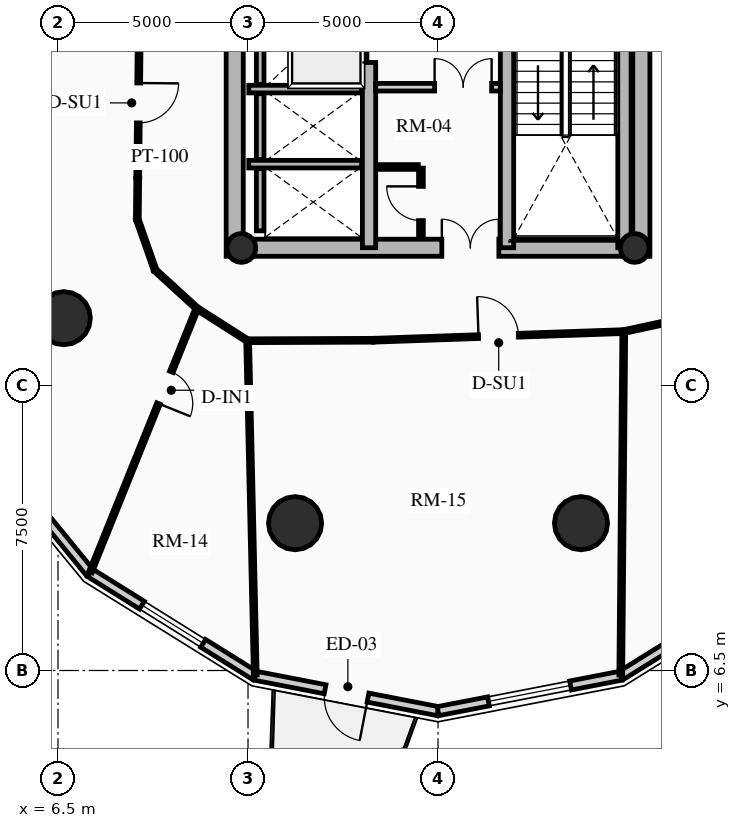
"""IFC4 building model, lengths in metres.
Left out: names, types, materials, properties, quantities, classifications, styles, units other than length and angle.
Written with IfcOpenShell. Run it as: python <this file> out.ifc"""

import sys

from ifc_helpers import new_model, si_unit, direction, frame, frame_2d, origin, origin_2d, place, context, subcontext, project, spatial, rectangle, circle, hollow_circle, extrude, source, transform, mapped, element, fill, save


model = new_model("IFC4")
c1 = context("Model", 3, precision=1e-05, world=origin(), true_north=direction((0.0, 1.0)))
c2 = subcontext(c1, "Body", "Model", "MODEL_VIEW")
j1 = project(units=[si_unit("LENGTHUNIT", "METRE"), si_unit("PLANEANGLEUNIT", "RADIAN")], contexts=[c1])
p1 = place(None, origin())
s1 = spatial("IfcSite", under=j1, at=p1, CompositionType="ELEMENT")
p2 = place(p1, origin())
s2 = spatial("IfcBuilding", under=s1, at=p2, CompositionType="ELEMENT")
p3 = place(p2, frame((0.0, 0.0, 96.34)))
s3 = spatial("IfcBuildingStorey", under=s2, at=p3, CompositionType="ELEMENT", Elevation=96.34)
for number, where, z_axis, x_axis in (
    (1, (11.15, 17.4, 0.0), (0.0, 0.0, 1.0), (0.0, 1.0, 0.0)),
    (2, (21.85, 17.4, 0.0), (0.0, 0.0, 1.0), (0.0, 1.0, 0.0)),
):
    element("IfcWall", number, at=place(p3, frame(where, z_axis=z_axis, x_axis=x_axis)), inside=s3, PredefinedType="SHEAR", context=c2, shape_type="SweptSolid", body=[
        extrude(rectangle(XDim=14.2, YDim=0.45, at=frame_2d((7.1, 0.0))), origin(), (0.0, 0.0, 1.0), 2.91),
    ])
p4 = place(p3, frame((11.15, 17.625, 0.0), z_axis=(0.0, 0.0, 1.0), x_axis=(1.0, 0.0, 0.0)))
e3 = element("IfcWall", 3, at=p4, inside=s3, PredefinedType="SHEAR", context=c2, shape_type="SweptSolid", body=[
    extrude(rectangle(XDim=10.7, YDim=0.45, at=frame_2d((5.35, 0.0))), origin(), (0.0, 0.0, 1.0), 2.91),
])
m1 = source(origin(), c2, "Body", "SweptSolid", [
    extrude(rectangle(XDim=1.5, YDim=2.02, at=frame_2d((0.75, 1.01))), frame((0.0, 0.235, 0.0), z_axis=(0.0, -1.0, 0.0), x_axis=(1.0, 0.0, 0.0)), (0.0, 0.0, 1.0), 0.47),
])
p5 = place(p4, frame((5.45, 0.0, 0.0)))
e4 = element("IfcOpeningElement", 4, at=p5, cuts=e3, PredefinedType="OPENING", context=c2, shape_type="MappedRepresentation", body=[
    mapped(m1, transform((0.0, 0.0, 0.0), x_axis=(1.0, 0.0, 0.0), y_axis=(0.0, 1.0, 0.0), z_axis=(0.0, 0.0, 1.0), scale=1.0)),
])
p6 = place(p3, frame((14.685, 17.625, 0.0), z_axis=(0.0, 0.0, 1.0), x_axis=(0.0, 1.0, 0.0)))
e5 = element("IfcWall", 5, at=p6, inside=s3, PredefinedType="SHEAR", context=c2, shape_type="SweptSolid", body=[
    extrude(rectangle(XDim=13.75, YDim=0.35, at=frame_2d((6.875, 0.0))), origin(), (0.0, 0.0, 1.0), 2.91),
])
m2 = source(origin(), c2, "Body", "SweptSolid", [
    extrude(rectangle(XDim=1.1, YDim=2.015, at=frame_2d((0.55, 1.007))), frame((0.0, 0.185, 0.0), z_axis=(0.0, -1.0, 0.0), x_axis=(1.0, 0.0, 0.0)), (0.0, 0.0, 1.0), 0.37),
])
p7 = place(p6, frame((4.875, 0.0, 0.0)))
e6 = element("IfcOpeningElement", 6, at=p7, cuts=e5, PredefinedType="OPENING", context=c2, shape_type="MappedRepresentation", body=[
    mapped(m2, transform((0.0, 0.0, 0.0), x_axis=(1.0, 0.0, 0.0), y_axis=(0.0, 1.0, 0.0), z_axis=(0.0, 0.0, 1.0), scale=1.0)),
])
m3 = source(origin(), c2, "Body", "SweptSolid", [
    extrude(rectangle(XDim=1.15, YDim=2.02, at=frame_2d((0.575, 1.01))), frame((0.0, 0.185, 0.0), z_axis=(0.0, -1.0, 0.0), x_axis=(1.0, 0.0, 0.0)), (0.0, 0.0, 1.0), 0.37),
])
p8 = place(p6, frame((7.295, 0.0, 0.0)))
e7 = element("IfcOpeningElement", 7, at=p8, cuts=e5, PredefinedType="OPENING", context=c2, shape_type="MappedRepresentation", body=[
    mapped(m3, transform((0.0, 0.0, 0.0), x_axis=(1.0, 0.0, 0.0), y_axis=(0.0, 1.0, 0.0), z_axis=(0.0, 0.0, 1.0), scale=1.0)),
])
p9 = place(p3, frame((18.315, 17.625, 0.0), z_axis=(0.0, 0.0, 1.0), x_axis=(0.0, 1.0, 0.0)))
e8 = element("IfcWall", 8, at=p9, inside=s3, PredefinedType="SHEAR", context=c2, shape_type="SweptSolid", body=[
    extrude(rectangle(XDim=13.75, YDim=0.35, at=frame_2d((6.875, 0.0))), origin(), (0.0, 0.0, 1.0), 2.91),
])
p10 = place(p9, frame((10.0, 0.0, 0.0)))
e9 = element("IfcOpeningElement", 9, at=p10, cuts=e8, PredefinedType="OPENING", context=c2, shape_type="MappedRepresentation", body=[
    mapped(m2, transform((0.0, 0.0, 0.0), x_axis=(1.0, 0.0, 0.0), y_axis=(0.0, 1.0, 0.0), z_axis=(0.0, 0.0, 1.0), scale=1.0)),
])
p11 = place(p9, frame((12.0, 0.0, 0.0)))
e10 = element("IfcOpeningElement", 10, at=p11, cuts=e8, PredefinedType="OPENING", context=c2, shape_type="MappedRepresentation", body=[
    mapped(m2, transform((0.0, 0.0, 0.0), x_axis=(1.0, 0.0, 0.0), y_axis=(0.0, 1.0, 0.0), z_axis=(0.0, 0.0, 1.0), scale=1.0)),
])
p12 = place(p9, frame((5.305, 0.0, 0.0)))
e11 = element("IfcOpeningElement", 11, at=p12, cuts=e8, PredefinedType="OPENING", context=c2, shape_type="MappedRepresentation", body=[
    mapped(m3, transform((0.0, 0.0, 0.0), x_axis=(1.0, 0.0, 0.0), y_axis=(0.0, 1.0, 0.0), z_axis=(0.0, 0.0, 1.0), scale=1.0)),
])
p13 = place(p3, frame((21.405, 17.625, 0.0), z_axis=(0.0, 0.0, 1.0), x_axis=(0.0, 1.0, 0.0)))
e12 = element("IfcWall", 12, at=p13, inside=s3, PredefinedType="SHEAR", context=c2, shape_type="SweptSolid", body=[
    extrude(rectangle(XDim=6.72, YDim=0.35, at=frame_2d((3.36, 0.0))), origin(), (0.0, 0.0, 1.0), 2.91),
])
for number, where, z_axis, x_axis in (
    (13, (11.325, 17.62, 0.0), (0.0, 0.0, 1.0), (1.0, 0.0, 0.0)),
    (14, (21.675, 17.62, 0.0), (0.0, 0.0, 1.0), (1.0, 0.0, 0.0)),
):
    element("IfcColumn", number, at=place(p3, frame(where, z_axis=z_axis, x_axis=x_axis)), inside=s3, PredefinedType="COLUMN", context=c2, shape_type="SweptSolid", body=[
        extrude(hollow_circle(Radius=0.38, WallThickness=0.032, at=origin_2d()), origin(), (0.0, 0.0, 1.0), 2.91),
    ])
for number, where, z_axis, x_axis in (
    (15, (6.653, 15.771, 0.0), (0.0, 0.0, 1.0), (1.0, 0.0, 0.0)),
    (16, (12.739, 10.377, 0.0), (0.0, 0.0, 1.0), (1.0, 0.0, 0.0)),
    (17, (20.261, 10.377, 0.0), (0.0, 0.0, 1.0), (1.0, 0.0, 0.0)),
):
    element("IfcColumn", number, at=place(p3, frame(where, z_axis=z_axis, x_axis=x_axis)), inside=s3, PredefinedType="USERDEFINED", context=c2, shape_type="SweptSolid", body=[
        extrude(circle(Radius=0.7, at=origin_2d()), origin(), (0.0, 0.0, 1.0), 2.91),
    ])
p14 = place(p3, frame((7.342, 9.072, 0.0), z_axis=(0.0, 0.0, 1.0), x_axis=(-0.632700781152, 0.77439635945, 0.0)))
e18 = element("IfcWall", 18, at=p14, inside=s3, PredefinedType="SOLIDWALL", context=c2, shape_type="SweptSolid", body=[
    extrude(rectangle(XDim=5.448, YDim=0.24, at=frame_2d((2.724, 0.0))), origin(), (0.0, 0.0, 1.0), 2.179),
])
p15 = place(p3, frame((11.685, 6.363, 0.0), z_axis=(0.0, 0.0, 1.0), x_axis=(-0.848520380187, 0.529162701263, 0.0)))
e19 = element("IfcWall", 19, at=p15, inside=s3, PredefinedType="SOLIDWALL", context=c2, shape_type="SweptSolid", body=[
    extrude(rectangle(XDim=5.119, YDim=0.24, at=frame_2d((2.56, 0.0))), origin(), (0.0, 0.0, 1.0), 2.179),
])
m4 = source(origin(), c2, "Body", "SweptSolid", [
    extrude(rectangle(XDim=1.9, YDim=1.35, at=frame_2d((0.95, 0.675))), frame((0.0, 0.13, 0.0), z_axis=(0.0, -1.0, 0.0), x_axis=(1.0, 0.0, 0.0)), (0.0, 0.0, 1.0), 0.26),
])
p16 = place(p15, frame((1.609, 0.0, 0.65)))
e20 = element("IfcOpeningElement", 20, at=p16, cuts=e19, PredefinedType="OPENING", context=c2, shape_type="MappedRepresentation", body=[
    mapped(m4, transform((0.0, 0.0, 0.0), x_axis=(1.0, 0.0, 0.0), y_axis=(0.0, 1.0, 0.0), z_axis=(0.0, 0.0, 1.0), scale=1.0)),
])
p17 = place(p3, frame((16.5, 5.43, 0.0), z_axis=(0.0, 0.0, 1.0), x_axis=(-0.981723785992, 0.190311344954, 0.0)))
e21 = element("IfcWall", 21, at=p17, inside=s3, PredefinedType="SOLIDWALL", context=c2, shape_type="SweptSolid", body=[
    extrude(rectangle(XDim=4.904, YDim=0.24, at=frame_2d((2.452, 0.0))), origin(), (0.0, 0.0, 1.0), 2.179),
])
m5 = source(origin(), c2, "Body", "SweptSolid", [
    extrude(rectangle(XDim=1.15, YDim=2.005, at=frame_2d((0.575, 1.002))), frame((0.0, 0.13, 0.0), z_axis=(0.0, -1.0, 0.0), x_axis=(1.0, 0.0, 0.0)), (0.0, 0.0, 1.0), 0.26),
])
p18 = place(p17, frame((1.877, 0.0, 0.0)))
e22 = element("IfcOpeningElement", 22, at=p18, cuts=e21, PredefinedType="OPENING", context=c2, shape_type="MappedRepresentation", body=[
    mapped(m5, transform((0.0, 0.0, 0.0), x_axis=(1.0, 0.0, 0.0), y_axis=(0.0, 1.0, 0.0), z_axis=(0.0, 0.0, 1.0), scale=1.0)),
])
p19 = place(p3, frame((21.315, 6.363, 0.0), z_axis=(0.0, 0.0, 1.0), x_axis=(-0.981723785992, -0.190311344954, 0.0)))
e23 = element("IfcWall", 23, at=p19, inside=s3, PredefinedType="SOLIDWALL", context=c2, shape_type="SweptSolid", body=[
    extrude(rectangle(XDim=4.904, YDim=0.24, at=frame_2d((2.452, 0.0))), origin(), (0.0, 0.0, 1.0), 2.179),
])
m6 = source(origin(), c2, "Body", "SweptSolid", [
    extrude(rectangle(XDim=2.2, YDim=1.35, at=frame_2d((1.1, 0.675))), frame((0.0, 0.13, 0.0), z_axis=(0.0, -1.0, 0.0), x_axis=(1.0, 0.0, 0.0)), (0.0, 0.0, 1.0), 0.26),
])
p20 = place(p19, frame((1.352, 0.0, 0.65)))
e24 = element("IfcOpeningElement", 24, at=p20, cuts=e23, PredefinedType="OPENING", context=c2, shape_type="MappedRepresentation", body=[
    mapped(m6, transform((0.0, 0.0, 0.0), x_axis=(1.0, 0.0, 0.0), y_axis=(0.0, 1.0, 0.0), z_axis=(0.0, 0.0, 1.0), scale=1.0)),
])
p21 = place(p3, frame((25.658, 9.072, 0.0), z_axis=(0.0, 0.0, 1.0), x_axis=(-0.848520380187, -0.529162701263, 0.0)))
e25 = element("IfcWall", 25, at=p21, inside=s3, PredefinedType="SOLIDWALL", context=c2, shape_type="SweptSolid", body=[
    extrude(rectangle(XDim=5.119, YDim=0.24, at=frame_2d((2.56, 0.0))), origin(), (0.0, 0.0, 1.0), 2.179),
])
p22 = place(p3, frame((11.52, 21.8, 0.0), z_axis=(0.0, 0.0, 1.0), x_axis=(1.0, 0.0, 0.0)))
e26 = element("IfcWall", 26, at=p22, inside=s3, PredefinedType="SHEAR", context=c2, shape_type="SweptSolid", body=[
    extrude(rectangle(XDim=2.97, YDim=0.2, at=frame_2d((1.485, 0.0))), origin(), (0.0, 0.0, 1.0), 2.91),
])
p23 = place(p3, frame((11.82, 21.92, 0.0), z_axis=(0.0, 0.0, 1.0), x_axis=(0.0, 1.0, 0.0)))
e27 = element("IfcWall", 27, at=p23, inside=s3, PredefinedType="SHEAR", context=c2, shape_type="SweptSolid", body=[
    extrude(rectangle(XDim=2.44, YDim=0.2, at=frame_2d((1.22, 0.0))), origin(), (0.0, 0.0, 1.0), 2.91),
])
p24 = place(p3, frame((11.52, 19.825, 0.0), z_axis=(0.0, 0.0, 1.0), x_axis=(1.0, 0.0, 0.0)))
e28 = element("IfcWall", 28, at=p24, inside=s3, PredefinedType="SHEAR", context=c2, shape_type="SweptSolid", body=[
    extrude(rectangle(XDim=2.97, YDim=0.2, at=frame_2d((1.485, 0.0))), origin(), (0.0, 0.0, 1.0), 2.91),
])
p25 = place(p3, frame((11.82, 19.945, 0.0), z_axis=(0.0, 0.0, 1.0), x_axis=(0.0, 1.0, 0.0)))
e29 = element("IfcWall", 29, at=p25, inside=s3, PredefinedType="SHEAR", context=c2, shape_type="SweptSolid", body=[
    extrude(rectangle(XDim=1.735, YDim=0.2, at=frame_2d((0.867, 0.0))), origin(), (0.0, 0.0, 1.0), 2.91),
])
p26 = place(p3, frame((11.82, 18.07, 0.0), z_axis=(0.0, 0.0, 1.0), x_axis=(0.0, 1.0, 0.0)))
e30 = element("IfcWall", 30, at=p26, inside=s3, PredefinedType="SHEAR", context=c2, shape_type="SweptSolid", body=[
    extrude(rectangle(XDim=1.635, YDim=0.2, at=frame_2d((0.817, 0.0))), origin(), (0.0, 0.0, 1.0), 2.91),
])
p27 = place(p3, frame((14.86, 21.85, 0.0), z_axis=(0.0, 0.0, 1.0), x_axis=(1.0, 0.0, 0.0)))
e31 = element("IfcWall", 31, at=p27, inside=s3, PredefinedType="PARTITIONING", context=c2, shape_type="SweptSolid", body=[
    extrude(rectangle(XDim=3.28, YDim=0.2, at=frame_2d((1.64, 0.0))), origin(), (0.0, 0.0, 1.0), 2.655),
])
m7 = source(origin(), c2, "Body", "SweptSolid", [
    extrude(rectangle(XDim=1.5, YDim=2.02, at=frame_2d((0.75, 1.01))), frame((0.0, 0.11, 0.0), z_axis=(0.0, -1.0, 0.0), x_axis=(1.0, 0.0, 0.0)), (0.0, 0.0, 1.0), 0.22),
])
p28 = place(p27, frame((1.55, 0.0, 0.0)))
e32 = element("IfcOpeningElement", 32, at=p28, cuts=e31, PredefinedType="OPENING", context=c2, shape_type="MappedRepresentation", body=[
    mapped(m7, transform((0.0, 0.0, 0.0), x_axis=(1.0, 0.0, 0.0), y_axis=(0.0, 1.0, 0.0), z_axis=(0.0, 0.0, 1.0), scale=1.0)),
])
p29 = place(p3, frame((16.05, 17.92, 0.0), z_axis=(0.0, 0.0, 1.0), x_axis=(0.0, 1.0, 0.0)))
e33 = element("IfcWall", 33, at=p29, inside=s3, PredefinedType="PARTITIONING", context=c2, shape_type="SweptSolid", body=[
    extrude(rectangle(XDim=1.8, YDim=0.125, at=frame_2d((0.9, 0.0))), origin(), (0.0, 0.0, 1.0), 2.655),
])
m8 = source(origin(), c2, "Body", "SweptSolid", [
    extrude(rectangle(XDim=0.9, YDim=2.005, at=frame_2d((0.45, 1.002))), frame((0.0, 0.073, 0.0), z_axis=(0.0, -1.0, 0.0), x_axis=(1.0, 0.0, 0.0)), (0.0, 0.0, 1.0), 0.145),
])
p30 = place(p29, frame((0.42, 0.0, 0.0)))
e34 = element("IfcOpeningElement", 34, at=p30, cuts=e33, PredefinedType="OPENING", context=c2, shape_type="MappedRepresentation", body=[
    mapped(m8, transform((0.0, 0.0, 0.0), x_axis=(1.0, 0.0, 0.0), y_axis=(0.0, 1.0, 0.0), z_axis=(0.0, 0.0, 1.0), scale=1.0)),
])
p31 = place(p3, frame((14.88, 19.75, 0.0), z_axis=(0.0, 0.0, 1.0), x_axis=(1.0, 0.0, 0.0)))
e35 = element("IfcWall", 35, at=p31, inside=s3, PredefinedType="PARTITIONING", context=c2, shape_type="SweptSolid", body=[
    extrude(rectangle(XDim=1.1, YDim=0.125, at=frame_2d((0.55, 0.0))), origin(), (0.0, 0.0, 1.0), 2.655),
])
p32 = place(p3, frame((8.65, 24.5, 0.0), z_axis=(0.0, 0.0, 1.0), x_axis=(-0.010196235655, -0.999948017038, 0.0)))
e36 = element("IfcWall", 36, at=p32, inside=s3, PredefinedType="MOVABLE", context=c2, shape_type="SweptSolid", body=[
    extrude(rectangle(XDim=6.13, YDim=0.1, at=frame_2d((3.065, 0.0))), origin(), (0.0, 0.0, 1.0), 2.225),
])
m9 = source(origin(), c2, "Body", "SweptSolid", [
    extrude(rectangle(XDim=1.05, YDim=2.015, at=frame_2d((0.525, 1.007))), frame((0.0, 0.06, 0.0), z_axis=(0.0, -1.0, 0.0), x_axis=(1.0, 0.0, 0.0)), (0.0, 0.0, 1.0), 0.12),
])
p33 = place(p32, frame((2.54, 0.0, 0.0)))
e37 = element("IfcOpeningElement", 37, at=p33, cuts=e36, PredefinedType="OPENING", context=c2, shape_type="MappedRepresentation", body=[
    mapped(m9, transform((0.0, 0.0, 0.0), x_axis=(1.0, 0.0, 0.0), y_axis=(0.0, 1.0, 0.0), z_axis=(0.0, 0.0, 1.0), scale=1.0)),
])
p34 = place(p3, frame((8.587, 18.371, 0.0), z_axis=(0.0, 0.0, 1.0), x_axis=(0.331494289155, -0.943457225452, 0.0)))
e38 = element("IfcWall", 38, at=p34, inside=s3, PredefinedType="MOVABLE", context=c2, shape_type="SweptSolid", body=[
    extrude(rectangle(XDim=1.416, YDim=0.1, at=frame_2d((0.708, 0.0))), origin(), (0.0, 0.0, 1.0), 2.225),
])
p35 = place(p3, frame((9.057, 17.034, 0.0), z_axis=(0.0, 0.0, 1.0), x_axis=(0.737874877538, -0.674937526811, 0.0)))
e39 = element("IfcWall", 39, at=p35, inside=s3, PredefinedType="MOVABLE", context=c2, shape_type="SweptSolid", body=[
    extrude(rectangle(XDim=1.49, YDim=0.1, at=frame_2d((0.745, 0.0))), origin(), (0.0, 0.0, 1.0), 2.225),
])
p36 = place(p3, frame((10.156, 16.029, 0.0), z_axis=(0.0, 0.0, 1.0), x_axis=(0.843127549493, -0.537713618282, 0.0)))
e40 = element("IfcWall", 40, at=p36, inside=s3, PredefinedType="MOVABLE", context=c2, shape_type="SweptSolid", body=[
    extrude(rectangle(XDim=1.583, YDim=0.1, at=frame_2d((0.792, 0.0))), origin(), (0.0, 0.0, 1.0), 2.225),
])
p37 = place(p3, frame((11.49, 15.178, 0.0), z_axis=(0.0, 0.0, 1.0), x_axis=(0.99999260582, 0.003845556538, 0.0)))
e41 = element("IfcWall", 41, at=p37, inside=s3, PredefinedType="MOVABLE", context=c2, shape_type="SweptSolid", body=[
    extrude(rectangle(XDim=3.301, YDim=0.1, at=frame_2d((1.651, 0.0))), origin(), (0.0, 0.0, 1.0), 2.225),
])
p38 = place(p3, frame((14.792, 15.191, 0.0), z_axis=(0.0, 0.0, 1.0), x_axis=(0.999405559957, 0.034475015985, 0.0)))
e42 = element("IfcWall", 42, at=p38, inside=s3, PredefinedType="MOVABLE", context=c2, shape_type="SweptSolid", body=[
    extrude(rectangle(XDim=6.6, YDim=0.1, at=frame_2d((3.3, 0.0))), origin(), (0.0, 0.0, 1.0), 2.225),
])
p39 = place(p38, frame((2.775, 0.0, 0.0)))
e43 = element("IfcOpeningElement", 43, at=p39, cuts=e42, PredefinedType="OPENING", context=c2, shape_type="MappedRepresentation", body=[
    mapped(m9, transform((0.0, 0.0, 0.0), x_axis=(1.0, 0.0, 0.0), y_axis=(0.0, 1.0, 0.0), z_axis=(0.0, 0.0, 1.0), scale=1.0)),
])
p40 = place(p3, frame((21.388, 15.418, 0.0), z_axis=(0.0, 0.0, 1.0), x_axis=(0.977297113048, 0.211873435874, 0.0)))
e44 = element("IfcWall", 44, at=p40, inside=s3, PredefinedType="MOVABLE", context=c2, shape_type="SweptSolid", body=[
    extrude(rectangle(XDim=1.877, YDim=0.1, at=frame_2d((0.938, 0.0))), origin(), (0.0, 0.0, 1.0), 2.225),
])
p41 = place(p3, frame((11.49, 15.178, 0.0), z_axis=(0.0, 0.0, 1.0), x_axis=(0.022838019925, -0.999739178409, 0.0)))
e45 = element("IfcWall", 45, at=p41, inside=s3, PredefinedType="MOVABLE", context=c2, shape_type="SweptSolid", body=[
    extrude(rectangle(XDim=8.798, YDim=0.1, at=frame_2d((4.399, 0.0))), origin(), (0.0, 0.0, 1.0), 2.179),
])
p42 = place(p3, frame((21.388, 15.418, 0.0), z_axis=(0.0, 0.0, 1.0), x_axis=(-0.008780834631, -0.999961447728, 0.0)))
e46 = element("IfcWall", 46, at=p42, inside=s3, PredefinedType="MOVABLE", context=c2, shape_type="SweptSolid", body=[
    extrude(rectangle(XDim=9.036, YDim=0.1, at=frame_2d((4.518, 0.0))), origin(), (0.0, 0.0, 1.0), 2.179),
])
p43 = place(p3, frame((10.156, 16.029, 0.0), z_axis=(0.0, 0.0, 1.0), x_axis=(-0.374397256956, -0.9272684045, 0.0)))
e47 = element("IfcWall", 47, at=p43, inside=s3, PredefinedType="MOVABLE", context=c2, shape_type="SweptSolid", body=[
    extrude(rectangle(XDim=7.485, YDim=0.1, at=frame_2d((3.743, 0.0))), origin(), (0.0, 0.0, 1.0), 2.179),
])
m10 = source(origin(), c2, "Body", "SweptSolid", [
    extrude(rectangle(XDim=0.9, YDim=2.005, at=frame_2d((0.45, 1.002))), frame((0.0, 0.06, 0.0), z_axis=(0.0, -1.0, 0.0), x_axis=(1.0, 0.0, 0.0)), (0.0, 0.0, 1.0), 0.12),
])
p44 = place(p43, frame((1.8, 0.0, 0.0)))
e48 = element("IfcOpeningElement", 48, at=p44, cuts=e47, PredefinedType="OPENING", context=c2, shape_type="MappedRepresentation", body=[
    mapped(m10, transform((0.0, 0.0, 0.0), x_axis=(1.0, 0.0, 0.0), y_axis=(0.0, 1.0, 0.0), z_axis=(0.0, 0.0, 1.0), scale=1.0)),
])
m11 = source(origin(), c2, "Body", "SweptSolid", [
    extrude(rectangle(XDim=1.9, YDim=1.35, at=frame_2d((0.95, 0.675))), frame((0.0, 0.03, 0.0), z_axis=(0.0, -1.0, 0.0), x_axis=(1.0, 0.0, 0.0)), (0.0, 0.0, 1.0), 0.06),
])
p45 = place(p16, origin())
e49 = element("IfcWindow", 49, at=p45, inside=s3, PartitioningType="DOUBLE_PANEL_VERTICAL", PredefinedType="WINDOW", context=c2, shape_type="MappedRepresentation", body=[
    mapped(m11, transform((0.0, 0.0, 0.0), x_axis=(1.0, 0.0, 0.0), y_axis=(0.0, 1.0, 0.0), z_axis=(0.0, 0.0, 1.0), scale=1.0)),
])
fill(e20, e49)
m12 = source(origin(), c2, "Body", "SweptSolid", [
    extrude(rectangle(XDim=1.15, YDim=2.005, at=frame_2d((0.575, 1.002))), frame((0.0, 0.025, 0.0), z_axis=(0.0, -1.0, 0.0), x_axis=(1.0, 0.0, 0.0)), (0.0, 0.0, 1.0), 0.05),
])
p46 = place(p18, origin())
e50 = element("IfcDoor", 50, at=p46, inside=s3, OperationType="SINGLE_SWING_LEFT", PredefinedType="DOOR", context=c2, shape_type="MappedRepresentation", body=[
    mapped(m12, transform((0.0, 0.0, 0.0), x_axis=(1.0, 0.0, 0.0), y_axis=(0.0, 1.0, 0.0), z_axis=(0.0, 0.0, 1.0), scale=1.0)),
])
fill(e22, e50)
m13 = source(origin(), c2, "Body", "SweptSolid", [
    extrude(rectangle(XDim=2.2, YDim=1.35, at=frame_2d((1.1, 0.675))), frame((0.0, 0.03, 0.0), z_axis=(0.0, -1.0, 0.0), x_axis=(1.0, 0.0, 0.0)), (0.0, 0.0, 1.0), 0.06),
])
p47 = place(p20, origin())
e51 = element("IfcWindow", 51, at=p47, inside=s3, PartitioningType="DOUBLE_PANEL_VERTICAL", PredefinedType="WINDOW", context=c2, shape_type="MappedRepresentation", body=[
    mapped(m13, transform((0.0, 0.0, 0.0), x_axis=(1.0, 0.0, 0.0), y_axis=(0.0, 1.0, 0.0), z_axis=(0.0, 0.0, 1.0), scale=1.0)),
])
fill(e24, e51)
m14 = source(origin(), c2, "Body", "SweptSolid", [
    extrude(rectangle(XDim=1.1, YDim=2.015, at=frame_2d((0.55, 1.007))), frame((0.0, 0.025, 0.0), z_axis=(0.0, -1.0, 0.0), x_axis=(1.0, 0.0, 0.0)), (0.0, 0.0, 1.0), 0.05),
])
p48 = place(p7, origin())
e52 = element("IfcDoor", 52, at=p48, inside=s3, OperationType="SLIDING_TO_LEFT", PredefinedType="DOOR", context=c2, shape_type="MappedRepresentation", body=[
    mapped(m14, transform((0.0, 0.0, 0.0), x_axis=(1.0, 0.0, 0.0), y_axis=(0.0, 1.0, 0.0), z_axis=(0.0, 0.0, 1.0), scale=1.0)),
])
fill(e6, e52)
m15 = source(origin(), c2, "Body", "SweptSolid", [
    extrude(rectangle(XDim=1.5, YDim=2.02, at=frame_2d((0.75, 1.01))), frame((0.0, 0.025, 0.0), z_axis=(0.0, -1.0, 0.0), x_axis=(1.0, 0.0, 0.0)), (0.0, 0.0, 1.0), 0.05),
])
p49 = place(p5, origin())
e53 = element("IfcDoor", 53, at=p49, inside=s3, OperationType="DOUBLE_DOOR_SINGLE_SWING", PredefinedType="DOOR", context=c2, shape_type="MappedRepresentation", body=[
    mapped(m15, transform((0.0, 0.0, 0.0), x_axis=(1.0, 0.0, 0.0), y_axis=(0.0, 1.0, 0.0), z_axis=(0.0, 0.0, 1.0), scale=1.0)),
])
fill(e4, e53)
p50 = place(p28, origin())
e54 = element("IfcDoor", 54, at=p50, inside=s3, OperationType="DOUBLE_DOOR_SINGLE_SWING", PredefinedType="DOOR", context=c2, shape_type="MappedRepresentation", body=[
    mapped(m15, transform((0.0, 0.0, 0.0), x_axis=(1.0, 0.0, 0.0), y_axis=(0.0, 1.0, 0.0), z_axis=(0.0, 0.0, 1.0), scale=1.0)),
])
fill(e32, e54)
m16 = source(origin(), c2, "Body", "SweptSolid", [
    extrude(rectangle(XDim=0.9, YDim=2.005, at=frame_2d((0.45, 1.002))), frame((0.0, 0.025, 0.0), z_axis=(0.0, -1.0, 0.0), x_axis=(1.0, 0.0, 0.0)), (0.0, 0.0, 1.0), 0.05),
])
p51 = place(p30, origin())
e55 = element("IfcDoor", 55, at=p51, inside=s3, OperationType="SINGLE_SWING_RIGHT", PredefinedType="DOOR", context=c2, shape_type="MappedRepresentation", body=[
    mapped(m16, transform((0.0, 0.0, 0.0), x_axis=(1.0, 0.0, 0.0), y_axis=(0.0, 1.0, 0.0), z_axis=(0.0, 0.0, 1.0), scale=1.0)),
])
fill(e34, e55)
m17 = source(origin(), c2, "Body", "SweptSolid", [
    extrude(rectangle(XDim=1.05, YDim=2.015, at=frame_2d((0.525, 1.007))), frame((0.0, 0.025, 0.0), z_axis=(0.0, -1.0, 0.0), x_axis=(1.0, 0.0, 0.0)), (0.0, 0.0, 1.0), 0.05),
])
p52 = place(p33, origin())
e56 = element("IfcDoor", 56, at=p52, inside=s3, OperationType="SINGLE_SWING_LEFT", PredefinedType="DOOR", context=c2, shape_type="MappedRepresentation", body=[
    mapped(m17, transform((0.0, 0.0, 0.0), x_axis=(1.0, 0.0, 0.0), y_axis=(0.0, 1.0, 0.0), z_axis=(0.0, 0.0, 1.0), scale=1.0)),
])
fill(e37, e56)
p53 = place(p44, origin())
e57 = element("IfcDoor", 57, at=p53, inside=s3, OperationType="SINGLE_SWING_RIGHT", PredefinedType="DOOR", context=c2, shape_type="MappedRepresentation", body=[
    mapped(m16, transform((0.0, 0.0, 0.0), x_axis=(1.0, 0.0, 0.0), y_axis=(0.0, 1.0, 0.0), z_axis=(0.0, 0.0, 1.0), scale=1.0)),
])
fill(e48, e57)
p54 = place(p39, origin())
e58 = element("IfcDoor", 58, at=p54, inside=s3, OperationType="SINGLE_SWING_LEFT", PredefinedType="DOOR", context=c2, shape_type="MappedRepresentation", body=[
    mapped(m17, transform((0.0, 0.0, 0.0), x_axis=(1.0, 0.0, 0.0), y_axis=(0.0, 1.0, 0.0), z_axis=(0.0, 0.0, 1.0), scale=1.0)),
])
fill(e43, e58)
save(model, sys.argv[1])
